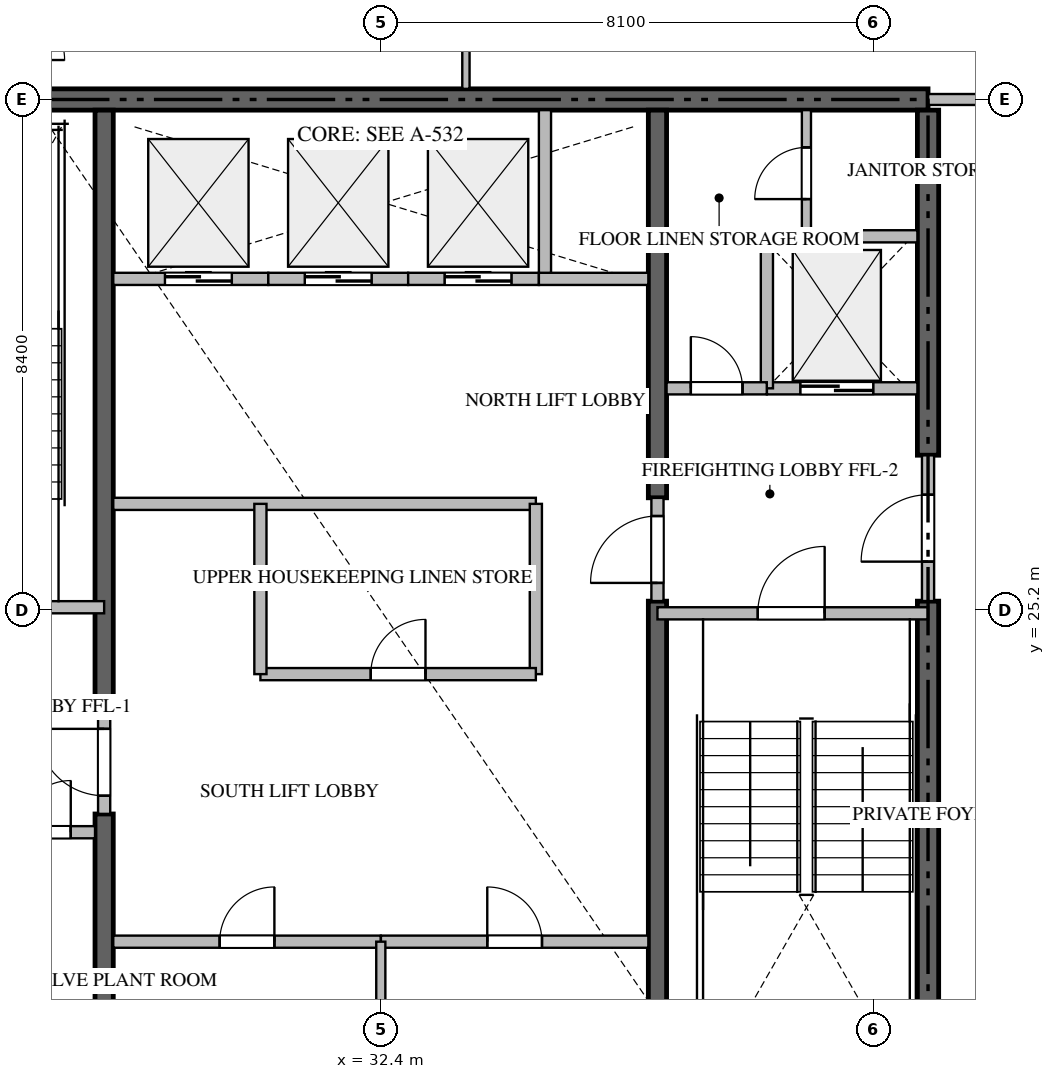
"""IFC4 building model, lengths in metres.
Left out: names, types, materials, properties, quantities, classifications, styles, units other than length and angle.
Written with IfcOpenShell. Run it as: python <this file> out.ifc"""

import sys

from ifc_helpers import new_model, si_unit, direction, frame, frame_2d, origin, place, context, subcontext, project, spatial, rectangle, extrude, source, transform, mapped, element, fill, save


model = new_model("IFC4")
c1 = context("Model", 3, precision=1e-05, world=origin(), true_north=direction((0.0, 1.0)))
c2 = subcontext(c1, "Body", "Model", "MODEL_VIEW")
j1 = project(units=[si_unit("LENGTHUNIT", "METRE"), si_unit("PLANEANGLEUNIT", "RADIAN")], contexts=[c1])
p1 = place(None, origin())
s1 = spatial("IfcSite", under=j1, at=p1, CompositionType="ELEMENT")
p2 = place(p1, origin())
s2 = spatial("IfcBuilding", under=s1, at=p2, CompositionType="ELEMENT")
p3 = place(p2, frame((0.0, 0.0, 317.75)))
s3 = spatial("IfcBuildingStorey", under=s2, at=p3, CompositionType="ELEMENT", Elevation=317.75)
p4 = place(p3, frame((41.4, 33.6, -0.26), z_axis=(0.0, 0.0, 1.0), x_axis=(-1.0, 0.0, 0.0)))
e1 = element("IfcWall", 1, at=p4, inside=s3, PredefinedType="SHEAR", context=c2, shape_type="SweptSolid", body=[
    extrude(rectangle(XDim=18.0, YDim=0.35, at=frame_2d((9.0, 0.0))), origin(), (0.0, 0.0, 1.0), 4.048),
])
p5 = place(p3, frame((41.4, 16.975, -0.26), z_axis=(0.0, 0.0, 1.0), x_axis=(0.0, 1.0, 0.0)))
e2 = element("IfcWall", 2, at=p5, inside=s3, PredefinedType="SHEAR", context=c2, shape_type="SweptSolid", body=[
    extrude(rectangle(XDim=8.375, YDim=0.35, at=frame_2d((4.188, 0.0))), origin(), (0.0, 0.0, 1.0), 4.048),
])
p6 = place(p3, frame((41.4, 27.75, -0.26), z_axis=(0.0, 0.0, 1.0), x_axis=(0.0, 1.0, 0.0)))
e3 = element("IfcWall", 3, at=p6, inside=s3, PredefinedType="SHEAR", context=c2, shape_type="SweptSolid", body=[
    extrude(rectangle(XDim=5.675, YDim=0.35, at=frame_2d((2.837, 0.0))), origin(), (0.0, 0.0, 1.0), 4.048),
])
p7 = place(p3, frame((27.85, 16.975, -0.26), z_axis=(0.0, 0.0, 1.0), x_axis=(0.0, 1.0, 0.0)))
e4 = element("IfcWall", 4, at=p7, inside=s3, PredefinedType="SHEAR", context=c2, shape_type="SweptSolid", body=[
    extrude(rectangle(XDim=4.875, YDim=0.3, at=frame_2d((2.438, 0.0))), origin(), (0.0, 0.0, 1.0), 4.048),
])
p8 = place(p3, frame((27.85, 23.55, -0.26), z_axis=(0.0, 0.0, 1.0), x_axis=(0.0, 1.0, 0.0)))
e5 = element("IfcWall", 5, at=p8, inside=s3, PredefinedType="SHEAR", context=c2, shape_type="SweptSolid", body=[
    extrude(rectangle(XDim=9.875, YDim=0.3, at=frame_2d((4.938, 0.0))), origin(), (0.0, 0.0, 1.0), 4.048),
])
p9 = place(p3, frame((36.95, 16.975, -0.26), z_axis=(0.0, 0.0, 1.0), x_axis=(0.0, 1.0, 0.0)))
e6 = element("IfcWall", 6, at=p9, inside=s3, PredefinedType="SHEAR", context=c2, shape_type="SweptSolid", body=[
    extrude(rectangle(XDim=8.375, YDim=0.3, at=frame_2d((4.188, 0.0))), origin(), (0.0, 0.0, 1.0), 4.048),
])
p10 = place(p3, frame((36.95, 27.05, -0.26), z_axis=(0.0, 0.0, 1.0), x_axis=(0.0, 1.0, 0.0)))
e7 = element("IfcWall", 7, at=p10, inside=s3, PredefinedType="SHEAR", context=c2, shape_type="SweptSolid", body=[
    extrude(rectangle(XDim=6.375, YDim=0.3, at=frame_2d((3.188, 0.0))), origin(), (0.0, 0.0, 1.0), 4.048),
])
p11 = place(p3, frame((23.4, 25.25, 0.0), z_axis=(0.0, 0.0, 1.0), x_axis=(1.0, 0.0, 0.0)))
e8 = element("IfcWall", 8, at=p11, inside=s3, PredefinedType="STANDARD", context=c2, shape_type="SweptSolid", body=[
    extrude(rectangle(XDim=4.45, YDim=0.2, at=frame_2d((2.225, 0.0))), origin(), (0.0, 0.0, 1.0), 3.79),
])
p12 = place(p11, frame((1.65, 0.0, 0.0)))
e9 = element("IfcOpeningElement", 9, at=p12, cuts=e8, PredefinedType="OPENING", context=c2, shape_type="SweptSolid", body=[
    extrude(rectangle(XDim=1.1, YDim=2.15, at=frame_2d((0.55, 1.075))), frame((0.0, 0.11, 0.0), z_axis=(0.0, -1.0, 0.0), x_axis=(1.0, 0.0, 0.0)), (0.0, 0.0, 1.0), 0.22),
])
p13 = place(p3, frame((36.95, 25.15, 0.0), z_axis=(0.0, 0.0, 1.0), x_axis=(1.0, 0.0, 0.0)))
e10 = element("IfcWall", 10, at=p13, inside=s3, PredefinedType="STANDARD", context=c2, shape_type="SweptSolid", body=[
    extrude(rectangle(XDim=4.45, YDim=0.2, at=frame_2d((2.225, 0.0))), origin(), (0.0, 0.0, 1.0), 3.79),
])
p14 = place(p13, frame((1.65, 0.0, 0.0)))
e11 = element("IfcOpeningElement", 11, at=p14, cuts=e10, PredefinedType="OPENING", context=c2, shape_type="SweptSolid", body=[
    extrude(rectangle(XDim=1.1, YDim=2.15, at=frame_2d((0.55, 1.075))), frame((0.0, 0.11, 0.0), z_axis=(0.0, -1.0, 0.0), x_axis=(1.0, 0.0, 0.0)), (0.0, 0.0, 1.0), 0.22),
])
p15 = place(p3, frame((38.75, 28.85, 0.0), z_axis=(0.0, 0.0, 1.0), x_axis=(1.0, 0.0, 0.0)))
e12 = element("IfcWall", 12, at=p15, inside=s3, PredefinedType="STANDARD", context=c2, shape_type="SweptSolid", body=[
    extrude(rectangle(XDim=2.475, YDim=0.2, at=frame_2d((1.238, 0.0))), origin(), (0.0, 0.0, 1.0), 3.79),
])
p16 = place(p15, frame((0.55, 0.0, 0.0)))
e13 = element("IfcOpeningElement", 13, at=p16, cuts=e12, PredefinedType="OPENING", context=c2, shape_type="SweptSolid", body=[
    extrude(rectangle(XDim=1.2, YDim=2.2, at=frame_2d((0.6, 1.1))), frame((0.0, 0.11, 0.0), z_axis=(0.0, -1.0, 0.0), x_axis=(1.0, 0.0, 0.0)), (0.0, 0.0, 1.0), 0.22),
])
p17 = place(p3, frame((28.0, 30.65, 0.0), z_axis=(0.0, 0.0, 1.0), x_axis=(1.0, 0.0, 0.0)))
e14 = element("IfcWall", 14, at=p17, inside=s3, PredefinedType="STANDARD", context=c2, shape_type="SweptSolid", body=[
    extrude(rectangle(XDim=2.55, YDim=0.2, at=frame_2d((1.275, 0.0))), origin(), (0.0, 0.0, 1.0), 3.79),
])
p18 = place(p17, frame((0.85, 0.0, 0.0)))
e15 = element("IfcOpeningElement", 15, at=p18, cuts=e14, PredefinedType="OPENING", context=c2, shape_type="SweptSolid", body=[
    extrude(rectangle(XDim=1.1, YDim=2.2, at=frame_2d((0.55, 1.1))), frame((0.0, 0.11, 0.0), z_axis=(0.0, -1.0, 0.0), x_axis=(1.0, 0.0, 0.0)), (0.0, 0.0, 1.0), 0.22),
])
p19 = place(p3, frame((30.55, 30.65, 0.0), z_axis=(0.0, 0.0, 1.0), x_axis=(1.0, 0.0, 0.0)))
e16 = element("IfcWall", 16, at=p19, inside=s3, PredefinedType="STANDARD", context=c2, shape_type="SweptSolid", body=[
    extrude(rectangle(XDim=2.3, YDim=0.2, at=frame_2d((1.15, 0.0))), origin(), (0.0, 0.0, 1.0), 3.79),
])
p20 = place(p19, frame((0.6, 0.0, 0.0)))
e17 = element("IfcOpeningElement", 17, at=p20, cuts=e16, PredefinedType="OPENING", context=c2, shape_type="SweptSolid", body=[
    extrude(rectangle(XDim=1.1, YDim=2.2, at=frame_2d((0.55, 1.1))), frame((0.0, 0.11, 0.0), z_axis=(0.0, -1.0, 0.0), x_axis=(1.0, 0.0, 0.0)), (0.0, 0.0, 1.0), 0.22),
])
p21 = place(p3, frame((32.85, 30.65, 0.0), z_axis=(0.0, 0.0, 1.0), x_axis=(1.0, 0.0, 0.0)))
e18 = element("IfcWall", 18, at=p21, inside=s3, PredefinedType="STANDARD", context=c2, shape_type="SweptSolid", body=[
    extrude(rectangle(XDim=2.15, YDim=0.2, at=frame_2d((1.075, 0.0))), origin(), (0.0, 0.0, 1.0), 3.79),
])
p22 = place(p21, frame((0.6, 0.0, 0.0)))
e19 = element("IfcOpeningElement", 19, at=p22, cuts=e18, PredefinedType="OPENING", context=c2, shape_type="SweptSolid", body=[
    extrude(rectangle(XDim=1.1, YDim=2.2, at=frame_2d((0.55, 1.1))), frame((0.0, 0.11, 0.0), z_axis=(0.0, -1.0, 0.0), x_axis=(1.0, 0.0, 0.0)), (0.0, 0.0, 1.0), 0.22),
])
p23 = place(p3, frame((35.0, 30.65, 0.0), z_axis=(0.0, 0.0, 1.0), x_axis=(1.0, 0.0, 0.0)))
e20 = element("IfcWall", 20, at=p23, inside=s3, PredefinedType="STANDARD", context=c2, shape_type="SweptSolid", body=[
    extrude(rectangle(XDim=1.8, YDim=0.2, at=frame_2d((0.9, 0.0))), origin(), (0.0, 0.0, 1.0), 3.79),
])
p24 = place(p3, frame((35.1, 30.75, 0.0), z_axis=(0.0, 0.0, 1.0), x_axis=(0.0, 1.0, 0.0)))
e21 = element("IfcWall", 21, at=p24, inside=s3, PredefinedType="STANDARD", context=c2, shape_type="SweptSolid", body=[
    extrude(rectangle(XDim=2.675, YDim=0.2, at=frame_2d((1.337, 0.0))), origin(), (0.0, 0.0, 1.0), 3.79),
])
p25 = place(p3, frame((26.052, 21.55, 0.0), z_axis=(0.0, 0.0, 1.0), x_axis=(1.0, 0.0, 0.0)))
e22 = element("IfcWall", 22, at=p25, inside=s3, PredefinedType="STANDARD", context=c2, shape_type="SweptSolid", body=[
    extrude(rectangle(XDim=1.648, YDim=0.2, at=frame_2d((0.824, 0.0))), origin(), (0.0, 0.0, 1.0), 3.79),
])
p26 = place(p25, frame((0.399, 0.0, 0.0)))
e23 = element("IfcOpeningElement", 23, at=p26, cuts=e22, PredefinedType="OPENING", context=c2, shape_type="SweptSolid", body=[
    extrude(rectangle(XDim=0.85, YDim=2.1, at=frame_2d((0.425, 1.05))), frame((0.0, 0.11, 0.0), z_axis=(0.0, -1.0, 0.0), x_axis=(1.0, 0.0, 0.0)), (0.0, 0.0, 1.0), 0.22),
])
p27 = place(p3, frame((38.75, 28.85, 0.0), z_axis=(0.0, 0.0, 1.0), x_axis=(0.0, 1.0, 0.0)))
e24 = element("IfcWall", 24, at=p27, inside=s3, PredefinedType="STANDARD", context=c2, shape_type="SweptSolid", body=[
    extrude(rectangle(XDim=2.5, YDim=0.2, at=frame_2d((1.25, 0.0))), origin(), (0.0, 0.0, 1.0), 3.79),
])
p28 = place(p3, frame((38.75, 31.35, 0.0), z_axis=(0.0, 0.0, 1.0), x_axis=(1.0, 0.0, 0.0)))
e25 = element("IfcWall", 25, at=p28, inside=s3, PredefinedType="STANDARD", context=c2, shape_type="SweptSolid", body=[
    extrude(rectangle(XDim=2.475, YDim=0.2, at=frame_2d((1.238, 0.0))), origin(), (0.0, 0.0, 1.0), 3.79),
])
p29 = place(p3, frame((37.1, 28.85, 0.0), z_axis=(0.0, 0.0, 1.0), x_axis=(1.0, 0.0, 0.0)))
e26 = element("IfcWall", 26, at=p29, inside=s3, PredefinedType="STANDARD", context=c2, shape_type="SweptSolid", body=[
    extrude(rectangle(XDim=1.648, YDim=0.2, at=frame_2d((0.824, 0.0))), origin(), (0.0, 0.0, 1.0), 3.79),
])
p30 = place(p29, frame((0.399, 0.0, 0.0)))
e27 = element("IfcOpeningElement", 27, at=p30, cuts=e26, PredefinedType="OPENING", context=c2, shape_type="SweptSolid", body=[
    extrude(rectangle(XDim=0.85, YDim=2.1, at=frame_2d((0.425, 1.05))), frame((0.0, 0.11, 0.0), z_axis=(0.0, -1.0, 0.0), x_axis=(1.0, 0.0, 0.0)), (0.0, 0.0, 1.0), 0.22),
])
p31 = place(p3, frame((41.4, 25.352, 0.0), z_axis=(0.0, 0.0, 1.0), x_axis=(0.0, 1.0, 0.0)))
e28 = element("IfcWall", 28, at=p31, inside=s3, PredefinedType="STANDARD", context=c2, shape_type="SweptSolid", body=[
    extrude(rectangle(XDim=2.396, YDim=0.2, at=frame_2d((1.198, 0.0))), origin(), (0.0, 0.0, 1.0), 3.79),
])
p32 = place(p31, frame((0.648, 0.0, 0.0)))
e29 = element("IfcOpeningElement", 29, at=p32, cuts=e28, PredefinedType="OPENING", context=c2, shape_type="SweptSolid", body=[
    extrude(rectangle(XDim=1.1, YDim=2.15, at=frame_2d((0.55, 1.075))), frame((0.0, 0.11, 0.0), z_axis=(0.0, -1.0, 0.0), x_axis=(1.0, 0.0, 0.0)), (0.0, 0.0, 1.0), 0.22),
])
p33 = place(p3, frame((27.85, 21.852, 0.0), z_axis=(0.0, 0.0, 1.0), x_axis=(0.0, 1.0, 0.0)))
e30 = element("IfcWall", 30, at=p33, inside=s3, PredefinedType="STANDARD", context=c2, shape_type="SweptSolid", body=[
    extrude(rectangle(XDim=1.696, YDim=0.2, at=frame_2d((0.848, 0.0))), origin(), (0.0, 0.0, 1.0), 3.79),
])
p34 = place(p33, frame((0.298, 0.0, 0.0)))
e31 = element("IfcOpeningElement", 31, at=p34, cuts=e30, PredefinedType="OPENING", context=c2, shape_type="SweptSolid", body=[
    extrude(rectangle(XDim=1.1, YDim=2.15, at=frame_2d((0.55, 1.075))), frame((0.0, 0.11, 0.0), z_axis=(0.0, -1.0, 0.0), x_axis=(1.0, 0.0, 0.0)), (0.0, 0.0, 1.0), 0.22),
])
p35 = place(p3, frame((36.95, 25.352, 0.0), z_axis=(0.0, 0.0, 1.0), x_axis=(0.0, 1.0, 0.0)))
e32 = element("IfcWall", 32, at=p35, inside=s3, PredefinedType="STANDARD", context=c2, shape_type="SweptSolid", body=[
    extrude(rectangle(XDim=1.696, YDim=0.2, at=frame_2d((0.848, 0.0))), origin(), (0.0, 0.0, 1.0), 3.79),
])
p36 = place(p35, frame((0.298, 0.0, 0.0)))
e33 = element("IfcOpeningElement", 33, at=p36, cuts=e32, PredefinedType="OPENING", context=c2, shape_type="SweptSolid", body=[
    extrude(rectangle(XDim=1.1, YDim=2.15, at=frame_2d((0.55, 1.075))), frame((0.0, 0.11, 0.0), z_axis=(0.0, -1.0, 0.0), x_axis=(1.0, 0.0, 0.0)), (0.0, 0.0, 1.0), 0.22),
])
p37 = place(p3, frame((39.4, 31.35, 0.0), z_axis=(0.0, 0.0, 1.0), x_axis=(0.0, 1.0, 0.0)))
e34 = element("IfcWall", 34, at=p37, inside=s3, PredefinedType="PARTITIONING", context=c2, shape_type="SweptSolid", body=[
    extrude(rectangle(XDim=2.075, YDim=0.15, at=frame_2d((1.038, 0.0))), origin(), (0.0, 0.0, 1.0), 3.79),
])
p38 = place(p37, frame((0.612, 0.0, 0.0)))
e35 = element("IfcOpeningElement", 35, at=p38, cuts=e34, PredefinedType="OPENING", context=c2, shape_type="SweptSolid", body=[
    extrude(rectangle(XDim=0.85, YDim=2.1, at=frame_2d((0.425, 1.05))), frame((0.0, 0.085, 0.0), z_axis=(0.0, -1.0, 0.0), x_axis=(1.0, 0.0, 0.0)), (0.0, 0.0, 1.0), 0.17),
])
p39 = place(p3, frame((28.0, 19.75, 0.0), z_axis=(0.0, 0.0, 1.0), x_axis=(1.0, 0.0, 0.0)))
e36 = element("IfcWall", 36, at=p39, inside=s3, PredefinedType="STANDARD", context=c2, shape_type="SweptSolid", body=[
    extrude(rectangle(XDim=4.4, YDim=0.2, at=frame_2d((2.2, 0.0))), origin(), (0.0, 0.0, 1.0), 3.79),
])
p40 = place(p39, frame((1.75, 0.0, 0.0)))
e37 = element("IfcOpeningElement", 37, at=p40, cuts=e36, PredefinedType="OPENING", context=c2, shape_type="SweptSolid", body=[
    extrude(rectangle(XDim=0.9, YDim=2.1, at=frame_2d((0.45, 1.05))), frame((0.0, 0.11, 0.0), z_axis=(0.0, -1.0, 0.0), x_axis=(1.0, 0.0, 0.0)), (0.0, 0.0, 1.0), 0.22),
])
p41 = place(p3, frame((32.402, 19.75, 0.0), z_axis=(0.0, 0.0, 1.0), x_axis=(1.0, 0.0, 0.0)))
e38 = element("IfcWall", 38, at=p41, inside=s3, PredefinedType="STANDARD", context=c2, shape_type="SweptSolid", body=[
    extrude(rectangle(XDim=4.398, YDim=0.2, at=frame_2d((2.199, 0.0))), origin(), (0.0, 0.0, 1.0), 3.79),
])
p42 = place(p41, frame((1.749, 0.0, 0.0)))
e39 = element("IfcOpeningElement", 39, at=p42, cuts=e38, PredefinedType="OPENING", context=c2, shape_type="SweptSolid", body=[
    extrude(rectangle(XDim=0.9, YDim=2.1, at=frame_2d((0.45, 1.05))), frame((0.0, 0.11, 0.0), z_axis=(0.0, -1.0, 0.0), x_axis=(1.0, 0.0, 0.0)), (0.0, 0.0, 1.0), 0.22),
])
p43 = place(p3, frame((32.4, 17.02, 0.0), z_axis=(0.0, 0.0, 1.0), x_axis=(0.0, 1.0, 0.0)))
e40 = element("IfcWall", 40, at=p43, inside=s3, PredefinedType="PARTITIONING", context=c2, shape_type="SweptSolid", body=[
    extrude(rectangle(XDim=2.73, YDim=0.15, at=frame_2d((1.365, 0.0))), origin(), (0.0, 0.0, 1.0), 3.79),
])
p44 = place(p3, frame((28.0, 26.95, 0.0), z_axis=(0.0, 0.0, 1.0), x_axis=(1.0, 0.0, 0.0)))
e41 = element("IfcWall", 41, at=p44, inside=s3, PredefinedType="STANDARD", context=c2, shape_type="SweptSolid", body=[
    extrude(rectangle(XDim=6.95, YDim=0.2, at=frame_2d((3.475, 0.0))), origin(), (0.0, 0.0, 1.0), 3.79),
])
p45 = place(p3, frame((34.95, 24.15, 0.0), z_axis=(0.0, 0.0, 1.0), x_axis=(0.0, 1.0, 0.0)))
e42 = element("IfcWall", 42, at=p45, inside=s3, PredefinedType="STANDARD", context=c2, shape_type="SweptSolid", body=[
    extrude(rectangle(XDim=2.8, YDim=0.2, at=frame_2d((1.4, 0.0))), origin(), (0.0, 0.0, 1.0), 3.79),
])
p46 = place(p3, frame((30.42, 24.15, 0.0), z_axis=(0.0, 0.0, 1.0), x_axis=(1.0, 0.0, 0.0)))
e43 = element("IfcWall", 43, at=p46, inside=s3, PredefinedType="STANDARD", context=c2, shape_type="SweptSolid", body=[
    extrude(rectangle(XDim=4.53, YDim=0.2, at=frame_2d((2.265, 0.0))), origin(), (0.0, 0.0, 1.0), 3.79),
])
p47 = place(p46, frame((1.815, 0.0, 0.0)))
e44 = element("IfcOpeningElement", 44, at=p47, cuts=e43, PredefinedType="OPENING", context=c2, shape_type="SweptSolid", body=[
    extrude(rectangle(XDim=0.9, YDim=2.1, at=frame_2d((0.45, 1.05))), frame((0.0, 0.11, 0.0), z_axis=(0.0, -1.0, 0.0), x_axis=(1.0, 0.0, 0.0)), (0.0, 0.0, 1.0), 0.22),
])
p48 = place(p3, frame((30.42, 24.15, 0.0), z_axis=(0.0, 0.0, 1.0), x_axis=(0.0, 1.0, 0.0)))
e45 = element("IfcWall", 45, at=p48, inside=s3, PredefinedType="STANDARD", context=c2, shape_type="SweptSolid", body=[
    extrude(rectangle(XDim=2.8, YDim=0.2, at=frame_2d((1.4, 0.0))), origin(), (0.0, 0.0, 1.0), 3.79),
])
p49 = place(p3, frame((41.402, 33.6, 0.0), z_axis=(0.0, 0.0, 1.0), x_axis=(1.0, 0.0, 0.0)))
e46 = element("IfcWall", 46, at=p49, inside=s3, PredefinedType="PARTITIONING", context=c2, shape_type="SweptSolid", body=[
    extrude(rectangle(XDim=2.496, YDim=0.18, at=frame_2d((1.248, 0.0))), origin(), (0.0, 0.0, 1.0), 3.79),
])
p50 = place(p3, frame((33.8, 35.748, 0.0), z_axis=(0.0, 0.0, 1.0), x_axis=(0.0, -1.0, 0.0)))
e47 = element("IfcWall", 47, at=p50, inside=s3, PredefinedType="PARTITIONING", context=c2, shape_type="SweptSolid", body=[
    extrude(rectangle(XDim=1.973, YDim=0.12, at=frame_2d((0.987, 0.0))), origin(), (0.0, 0.0, 1.0), 3.79),
])
m1 = source(origin(), c2, "Body", "SweptSolid", [
    extrude(rectangle(XDim=1.1, YDim=2.15, at=frame_2d((0.55, 1.075))), frame((0.0, 0.025, 0.0), z_axis=(0.0, -1.0, 0.0), x_axis=(1.0, 0.0, 0.0)), (0.0, 0.0, 1.0), 0.05),
])
p51 = place(p14, origin())
e48 = element("IfcDoor", 48, at=p51, inside=s3, OperationType="SINGLE_SWING_RIGHT", PredefinedType="DOOR", context=c2, shape_type="MappedRepresentation", body=[
    mapped(m1, transform((0.0, 0.0, 0.0), scale=1.0)),
])
fill(e11, e48)
m2 = source(origin(), c2, "Body", "SweptSolid", [
    extrude(rectangle(XDim=1.2, YDim=2.2, at=frame_2d((0.6, 1.1))), frame((0.0, 0.025, 0.0), z_axis=(0.0, -1.0, 0.0), x_axis=(1.0, 0.0, 0.0)), (0.0, 0.0, 1.0), 0.05),
])
p52 = place(p16, origin())
e49 = element("IfcDoor", 49, at=p52, inside=s3, OperationType="DOUBLE_DOOR_SLIDING", PredefinedType="DOOR", context=c2, shape_type="MappedRepresentation", body=[
    mapped(m2, transform((0.0, 0.0, 0.0), scale=1.0)),
])
fill(e13, e49)
m3 = source(origin(), c2, "Body", "SweptSolid", [
    extrude(rectangle(XDim=1.1, YDim=2.2, at=frame_2d((0.55, 1.1))), frame((0.0, 0.025, 0.0), z_axis=(0.0, -1.0, 0.0), x_axis=(1.0, 0.0, 0.0)), (0.0, 0.0, 1.0), 0.05),
])
p53 = place(p18, origin())
e50 = element("IfcDoor", 50, at=p53, inside=s3, OperationType="DOUBLE_DOOR_SLIDING", PredefinedType="DOOR", context=c2, shape_type="MappedRepresentation", body=[
    mapped(m3, transform((0.0, 0.0, 0.0), scale=1.0)),
])
fill(e15, e50)
p54 = place(p20, origin())
e51 = element("IfcDoor", 51, at=p54, inside=s3, OperationType="DOUBLE_DOOR_SLIDING", PredefinedType="DOOR", context=c2, shape_type="MappedRepresentation", body=[
    mapped(m3, transform((0.0, 0.0, 0.0), scale=1.0)),
])
fill(e17, e51)
p55 = place(p22, origin())
e52 = element("IfcDoor", 52, at=p55, inside=s3, OperationType="DOUBLE_DOOR_SLIDING", PredefinedType="DOOR", context=c2, shape_type="MappedRepresentation", body=[
    mapped(m3, transform((0.0, 0.0, 0.0), scale=1.0)),
])
fill(e19, e52)
m4 = source(origin(), c2, "Body", "SweptSolid", [
    extrude(rectangle(XDim=0.85, YDim=2.1, at=frame_2d((0.425, 1.05))), frame((0.0, 0.025, 0.0), z_axis=(0.0, -1.0, 0.0), x_axis=(1.0, 0.0, 0.0)), (0.0, 0.0, 1.0), 0.05),
])
p56 = place(p26, origin())
e53 = element("IfcDoor", 53, at=p56, inside=s3, OperationType="SINGLE_SWING_RIGHT", PredefinedType="DOOR", context=c2, shape_type="MappedRepresentation", body=[
    mapped(m4, transform((0.0, 0.0, 0.0), scale=1.0)),
])
fill(e23, e53)
p57 = place(p30, origin())
e54 = element("IfcDoor", 54, at=p57, inside=s3, OperationType="SINGLE_SWING_LEFT", PredefinedType="DOOR", context=c2, shape_type="MappedRepresentation", body=[
    mapped(m4, transform((0.0, 0.0, 0.0), scale=1.0)),
])
fill(e27, e54)
p58 = place(p32, origin())
e55 = element("IfcDoor", 55, at=p58, inside=s3, OperationType="SINGLE_SWING_LEFT", PredefinedType="DOOR", context=c2, shape_type="MappedRepresentation", body=[
    mapped(m1, transform((0.0, 0.0, 0.0), scale=1.0)),
])
fill(e29, e55)
p59 = place(p34, origin())
e56 = element("IfcDoor", 56, at=p59, inside=s3, OperationType="SINGLE_SWING_RIGHT", PredefinedType="DOOR", context=c2, shape_type="MappedRepresentation", body=[
    mapped(m1, transform((0.0, 0.0, 0.0), scale=1.0)),
])
fill(e31, e56)
p60 = place(p36, origin())
e57 = element("IfcDoor", 57, at=p60, inside=s3, OperationType="SINGLE_SWING_LEFT", PredefinedType="DOOR", context=c2, shape_type="MappedRepresentation", body=[
    mapped(m1, transform((0.0, 0.0, 0.0), scale=1.0)),
])
fill(e33, e57)
p61 = place(p38, origin())
e58 = element("IfcDoor", 58, at=p61, inside=s3, OperationType="SINGLE_SWING_LEFT", PredefinedType="DOOR", context=c2, shape_type="MappedRepresentation", body=[
    mapped(m4, transform((0.0, 0.0, 0.0), scale=1.0)),
])
fill(e35, e58)
m5 = source(origin(), c2, "Body", "SweptSolid", [
    extrude(rectangle(XDim=0.9, YDim=2.1, at=frame_2d((0.45, 1.05))), frame((0.0, 0.025, 0.0), z_axis=(0.0, -1.0, 0.0), x_axis=(1.0, 0.0, 0.0)), (0.0, 0.0, 1.0), 0.05),
])
p62 = place(p40, origin())
e59 = element("IfcDoor", 59, at=p62, inside=s3, OperationType="SINGLE_SWING_RIGHT", PredefinedType="DOOR", context=c2, shape_type="MappedRepresentation", body=[
    mapped(m5, transform((0.0, 0.0, 0.0), scale=1.0)),
])
fill(e37, e59)
p63 = place(p42, origin())
e60 = element("IfcDoor", 60, at=p63, inside=s3, OperationType="SINGLE_SWING_LEFT", PredefinedType="DOOR", context=c2, shape_type="MappedRepresentation", body=[
    mapped(m5, transform((0.0, 0.0, 0.0), scale=1.0)),
])
fill(e39, e60)
p64 = place(p47, origin())
e61 = element("IfcDoor", 61, at=p64, inside=s3, OperationType="SINGLE_SWING_RIGHT", PredefinedType="DOOR", context=c2, shape_type="MappedRepresentation", body=[
    mapped(m5, transform((0.0, 0.0, 0.0), scale=1.0)),
])
fill(e44, e61)
save(model, sys.argv[1])
